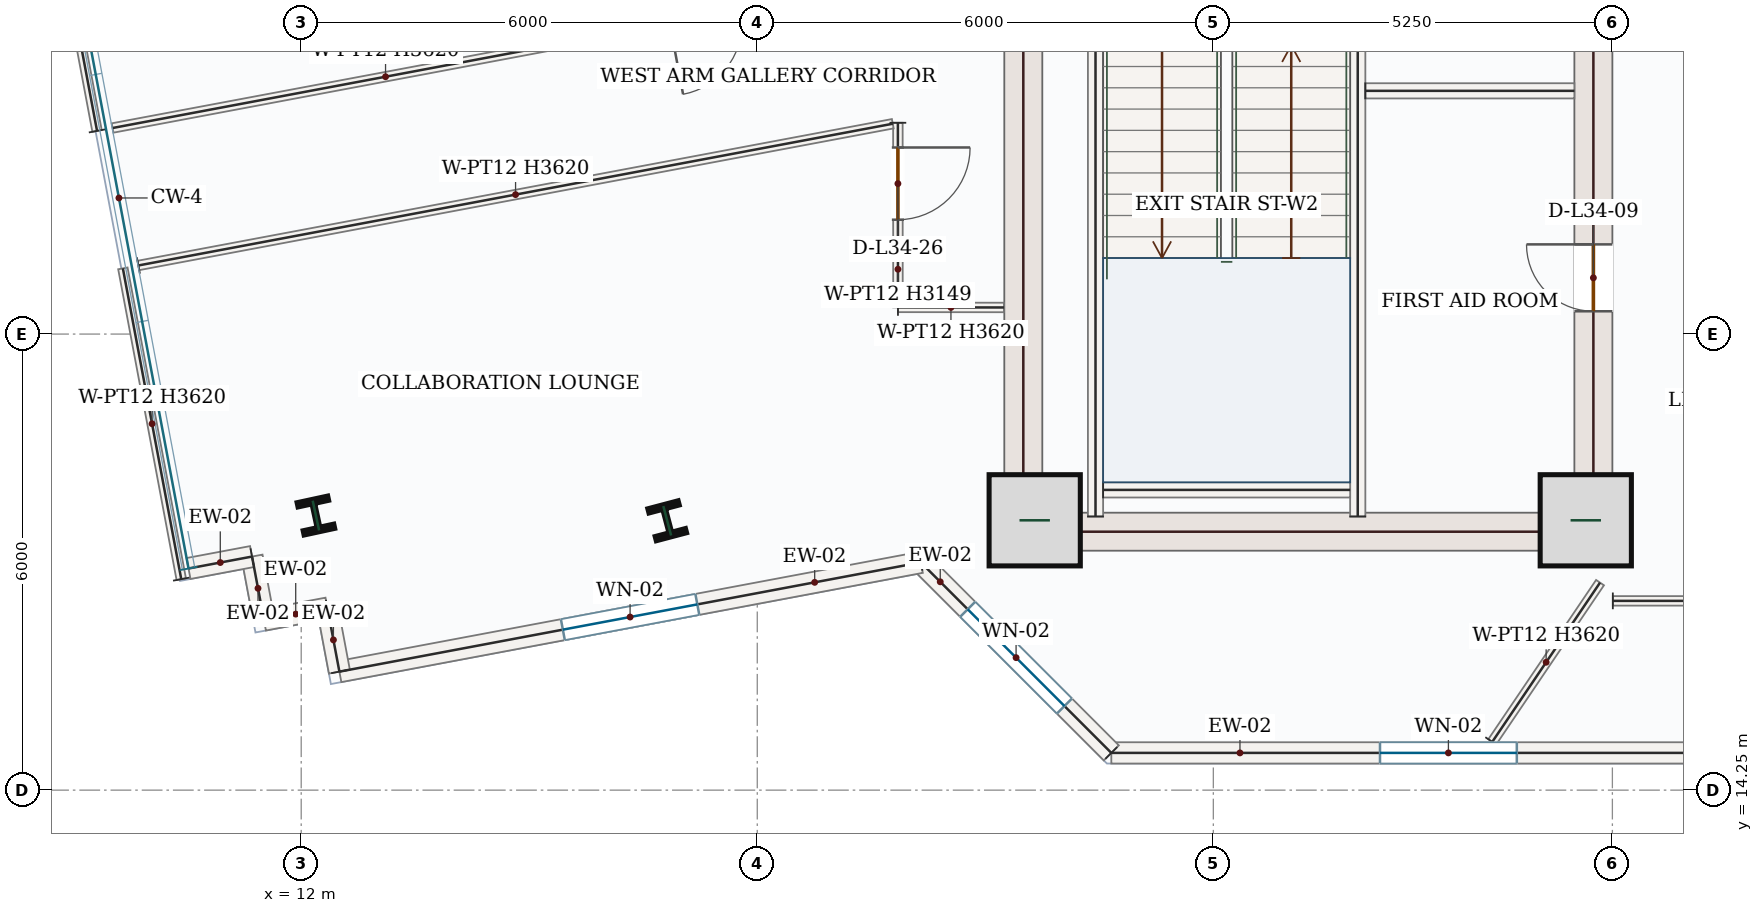
"""IFC4 building model, lengths in metres.
Left out: names, types, materials, properties, quantities, classifications, styles, units other than length and angle.
Written with IfcOpenShell. Run it as: python <this file> out.ifc"""

import sys

from ifc_helpers import new_model, si_unit, direction, frame, frame_2d, origin, origin_2d, place, context, subcontext, project, spatial, rectangle, i_section, extrude, source, transform, mapped, element, fill, save


model = new_model("IFC4")
c1 = context("Model", 3, precision=1e-05, world=origin(), true_north=direction((0.0, 1.0)))
c2 = subcontext(c1, "Body", "Model", "MODEL_VIEW")
j1 = project(units=[si_unit("LENGTHUNIT", "METRE"), si_unit("PLANEANGLEUNIT", "RADIAN")], contexts=[c1])
p1 = place(None, origin())
s1 = spatial("IfcSite", under=j1, at=p1, CompositionType="ELEMENT")
p2 = place(p1, origin())
s2 = spatial("IfcBuilding", under=s1, at=p2, CompositionType="ELEMENT")
p3 = place(p2, frame((0.0, 0.0, 151.2)))
s3 = spatial("IfcBuildingStorey", under=s2, at=p3, CompositionType="ELEMENT", Elevation=151.2)
m1 = source(origin(), c2, "Body", "SweptSolid", [
    extrude(rectangle(XDim=8.55, YDim=0.5, at=frame_2d((4.275, 0.0))), origin(), (0.0, 0.0, 1.0), 3.62),
])
p4 = place(p3, frame((21.5, 17.4, 0.0), z_axis=(0.0, 0.0, 1.0), x_axis=(0.0, 1.0, 0.0)))
e1 = element("IfcWall", 1, at=p4, inside=s3, PredefinedType="SHEAR", context=c2, shape_type="MappedRepresentation", body=[
    mapped(m1, transform((0.0, 0.0, 0.0), x_axis=(1.0, 0.0, 0.0), y_axis=(0.0, 1.0, 0.0), z_axis=(0.0, 0.0, 1.0), scale=1.0)),
])
p5 = place(p3, frame((29.0, 17.4, 0.0), z_axis=(0.0, 0.0, 1.0), x_axis=(0.0, 1.0, 0.0)))
e2 = element("IfcWall", 2, at=p5, inside=s3, PredefinedType="SHEAR", context=c2, shape_type="SweptSolid", body=[
    extrude(rectangle(XDim=8.55, YDim=0.5, at=frame_2d((4.275, 0.0))), origin(), (0.0, 0.0, 1.0), 3.62),
])
p6 = place(p5, frame((6.65, 0.0, 0.0)))
e3 = element("IfcOpeningElement", 3, at=p6, cuts=e2, PredefinedType="OPENING", context=c2, shape_type="SweptSolid", body=[
    extrude(rectangle(XDim=1.1, YDim=2.2, at=frame_2d((0.55, 1.1))), frame((0.0, 0.26, 0.0), z_axis=(0.0, -1.0, 0.0), x_axis=(1.0, 0.0, 0.0)), (0.0, 0.0, 1.0), 0.52),
])
p7 = place(p5, frame((3.15, 0.0, 0.0)))
e4 = element("IfcOpeningElement", 4, at=p7, cuts=e2, PredefinedType="OPENING", context=c2, shape_type="SweptSolid", body=[
    extrude(rectangle(XDim=0.88, YDim=2.1, at=frame_2d((0.44, 1.05))), frame((0.0, 0.26, 0.0), z_axis=(0.0, -1.0, 0.0), x_axis=(1.0, 0.0, 0.0)), (0.0, 0.0, 1.0), 0.52),
])
m2 = source(origin(), c2, "Body", "SweptSolid", [
    extrude(rectangle(XDim=7.0, YDim=0.5, at=frame_2d((3.5, 0.0))), origin(), (0.0, 0.0, 1.0), 3.62),
])
p8 = place(p3, frame((21.75, 17.65, 0.0), z_axis=(0.0, 0.0, 1.0), x_axis=(1.0, 0.0, 0.0)))
e5 = element("IfcWall", 5, at=p8, inside=s3, PredefinedType="SHEAR", context=c2, shape_type="MappedRepresentation", body=[
    mapped(m2, transform((0.0, 0.0, 0.0), x_axis=(1.0, 0.0, 0.0), y_axis=(0.0, 1.0, 0.0), z_axis=(0.0, 0.0, 1.0), scale=1.0)),
])
m3 = source(origin(), c2, "Body", "SweptSolid", [
    extrude(rectangle(XDim=1.2, YDim=1.2, at=origin_2d()), origin(), (0.0, 0.0, 1.0), 3.9),
])
for number, where, z_axis, x_axis in (
    (6, (21.65, 17.8, 0.0), (0.0, 0.0, 1.0), (1.0, 0.0, 0.0)),
    (7, (28.9, 17.8, 0.0), (0.0, 0.0, 1.0), (1.0, 0.0, 0.0)),
):
    element("IfcColumn", number, at=place(p3, frame(where, z_axis=z_axis, x_axis=x_axis)), inside=s3, PredefinedType="COLUMN", context=c2, shape_type="MappedRepresentation", body=[
        mapped(m3, transform((0.0, 0.0, 0.0), x_axis=(1.0, 0.0, 0.0), y_axis=(0.0, 1.0, 0.0), z_axis=(0.0, 0.0, 1.0), scale=1.0)),
    ])
m4 = source(origin(), c2, "Body", "SweptSolid", [
    extrude(i_section(OverallWidth=0.412, OverallDepth=0.435, WebThickness=0.036, FlangeThickness=0.057, FilletRadius=0.018, at=origin_2d()), origin(), (0.0, 0.0, 1.0), 3.9),
])
for number, where, z_axis, x_axis in (
    (8, (16.815, 17.794, 0.0), (0.0, 0.0, 1.0), (0.967, 0.255, 0.0)),
    (9, (12.193, 17.863, 0.0), (0.0, 0.0, 1.0), (0.977, 0.211, 0.0)),
):
    element("IfcColumn", number, at=place(p3, frame(where, z_axis=z_axis, x_axis=x_axis)), inside=s3, PredefinedType="COLUMN", context=c2, shape_type="MappedRepresentation", body=[
        mapped(m4, transform((0.0, 0.0, 0.0), x_axis=(1.0, 0.0, 0.0), y_axis=(0.0, 1.0, 0.0), z_axis=(0.0, 0.0, 1.0), scale=1.0)),
    ])
p9 = place(p3, frame((31.527, 14.74, 0.0), z_axis=(0.0, 0.0, 1.0), x_axis=(-1.0, 0.0, 0.0)))
e10 = element("IfcWall", 10, at=p9, inside=s3, PredefinedType="SOLIDWALL", context=c2, shape_type="SweptSolid", body=[
    extrude(rectangle(XDim=8.869, YDim=0.28, at=frame_2d((4.434, 0.0))), origin(), (0.0, 0.0, 1.0), 3.62),
])
p10 = place(p9, frame((3.534, 0.0, 0.85)))
e11 = element("IfcOpeningElement", 11, at=p10, cuts=e10, PredefinedType="OPENING", context=c2, shape_type="SweptSolid", body=[
    extrude(rectangle(XDim=1.8, YDim=1.75, at=frame_2d((0.9, 0.875))), frame((0.0, 0.15, 0.0), z_axis=(0.0, -1.0, 0.0), x_axis=(1.0, 0.0, 0.0)), (0.0, 0.0, 1.0), 0.3),
])
p11 = place(p3, frame((22.658, 14.74, 0.0), z_axis=(0.0, 0.0, 1.0), x_axis=(-0.707106781187, 0.707106781187, 0.0)))
e12 = element("IfcWall", 12, at=p11, inside=s3, PredefinedType="SOLIDWALL", context=c2, shape_type="SweptSolid", body=[
    extrude(rectangle(XDim=3.544, YDim=0.28, at=frame_2d((1.772, 0.0))), origin(), (0.0, 0.0, 1.0), 3.62),
])
p12 = place(p11, frame((0.872, 0.0, 0.85)))
e13 = element("IfcOpeningElement", 13, at=p12, cuts=e12, PredefinedType="OPENING", context=c2, shape_type="SweptSolid", body=[
    extrude(rectangle(XDim=1.8, YDim=1.75, at=frame_2d((0.9, 0.875))), frame((0.0, 0.15, 0.0), z_axis=(0.0, -1.0, 0.0), x_axis=(1.0, 0.0, 0.0)), (0.0, 0.0, 1.0), 0.3),
])
p13 = place(p3, frame((20.152, 17.246, 0.0), z_axis=(0.0, 0.0, 1.0), x_axis=(-0.982809278234, -0.18462373254, 0.0)))
e14 = element("IfcWall", 14, at=p13, inside=s3, PredefinedType="SOLIDWALL", context=c2, shape_type="SweptSolid", body=[
    extrude(rectangle(XDim=7.783, YDim=0.28, at=frame_2d((3.892, 0.0))), origin(), (0.0, 0.0, 1.0), 3.62),
])
p14 = place(p13, frame((2.992, 0.0, 0.85)))
e15 = element("IfcOpeningElement", 15, at=p14, cuts=e14, PredefinedType="OPENING", context=c2, shape_type="SweptSolid", body=[
    extrude(rectangle(XDim=1.8, YDim=1.75, at=frame_2d((0.9, 0.875))), frame((0.0, 0.15, 0.0), z_axis=(0.0, -1.0, 0.0), x_axis=(1.0, 0.0, 0.0)), (0.0, 0.0, 1.0), 0.3),
])
m5 = source(origin(), c2, "Body", "SweptSolid", [
    extrude(rectangle(XDim=0.85, YDim=0.28, at=frame_2d((0.425, 0.0))), origin(), (0.0, 0.0, 1.0), 3.62),
])
p15 = place(p3, frame((12.502, 15.809, 0.0), z_axis=(0.0, 0.0, 1.0), x_axis=(-0.184670010318, 0.982800583684, 0.0)))
e16 = element("IfcWall", 16, at=p15, inside=s3, PredefinedType="SOLIDWALL", context=c2, shape_type="MappedRepresentation", body=[
    mapped(m5, transform((0.0, 0.0, 0.0), x_axis=(1.0, 0.0, 0.0), y_axis=(0.0, 1.0, 0.0), z_axis=(0.0, 0.0, 1.0), scale=1.0)),
])
m6 = source(origin(), c2, "Body", "SweptSolid", [
    extrude(rectangle(XDim=0.85, YDim=0.28, at=frame_2d((0.425, 0.0))), origin(), (0.0, 0.0, 1.0), 3.62),
])
for number, where, z_axis, x_axis in (
    (17, (12.345, 16.645, 0.0), (0.0, 0.0, 1.0), (-0.983, -0.185, 0.0)),
    (18, (11.51, 16.488, 0.0), (0.0, 0.0, 1.0), (-0.185, 0.983, 0.0)),
):
    element("IfcWall", number, at=place(p3, frame(where, z_axis=z_axis, x_axis=x_axis)), inside=s3, PredefinedType="SOLIDWALL", context=c2, shape_type="MappedRepresentation", body=[
        mapped(m6, transform((0.0, 0.0, 0.0), x_axis=(1.0, 0.0, 0.0), y_axis=(0.0, 1.0, 0.0), z_axis=(0.0, 0.0, 1.0), scale=1.0)),
    ])
p16 = place(p3, frame((11.353, 17.323, 0.0), z_axis=(0.0, 0.0, 1.0), x_axis=(-0.982852672425, -0.184392582027, 0.0)))
e19 = element("IfcWall", 19, at=p16, inside=s3, PredefinedType="SOLIDWALL", context=c2, shape_type="MappedRepresentation", body=[
    mapped(m5, transform((0.0, 0.0, 0.0), x_axis=(1.0, 0.0, 0.0), y_axis=(0.0, 1.0, 0.0), z_axis=(0.0, 0.0, 1.0), scale=1.0)),
])
m7 = source(origin(), c2, "Body", "SweptSolid", [
    extrude(rectangle(XDim=7.87, YDim=0.2, at=frame_2d((3.935, 0.0))), origin(), (0.0, 0.0, 1.0), 3.62),
])
p17 = place(p3, frame((22.45, 17.85, 0.0), z_axis=(0.0, 0.0, 1.0), x_axis=(0.0, 1.0, 0.0)))
e20 = element("IfcWall", 20, at=p17, inside=s3, PredefinedType="SOLIDWALL", context=c2, shape_type="MappedRepresentation", body=[
    mapped(m7, transform((0.0, 0.0, 0.0), x_axis=(1.0, 0.0, 0.0), y_axis=(0.0, 1.0, 0.0), z_axis=(0.0, 0.0, 1.0), scale=1.0)),
])
p18 = place(p3, frame((25.9, 17.85, 0.0), z_axis=(0.0, 0.0, 1.0), x_axis=(0.0, 1.0, 0.0)))
e21 = element("IfcWall", 21, at=p18, inside=s3, PredefinedType="SOLIDWALL", context=c2, shape_type="SweptSolid", body=[
    extrude(rectangle(XDim=8.0, YDim=0.2, at=frame_2d((4.0, 0.0))), origin(), (0.0, 0.0, 1.0), 3.62),
])
p19 = place(p18, frame((6.3, 0.0, 0.0)))
e22 = element("IfcOpeningElement", 22, at=p19, cuts=e21, PredefinedType="OPENING", context=c2, shape_type="SweptSolid", body=[
    extrude(rectangle(XDim=1.05, YDim=2.15, at=frame_2d((0.525, 1.075))), frame((0.0, 0.11, 0.0), z_axis=(0.0, -1.0, 0.0), x_axis=(1.0, 0.0, 0.0)), (0.0, 0.0, 1.0), 0.22),
])
m8 = source(origin(), c2, "Body", "SweptSolid", [
    extrude(rectangle(XDim=3.25, YDim=0.2, at=frame_2d((1.625, 0.0))), origin(), (0.0, 0.0, 1.0), 3.62),
])
p20 = place(p3, frame((22.55, 18.2, 0.0), z_axis=(0.0, 0.0, 1.0), x_axis=(1.0, 0.0, 0.0)))
e23 = element("IfcWall", 23, at=p20, inside=s3, PredefinedType="SOLIDWALL", context=c2, shape_type="MappedRepresentation", body=[
    mapped(m8, transform((0.0, 0.0, 0.0), x_axis=(1.0, 0.0, 0.0), y_axis=(0.0, 1.0, 0.0), z_axis=(0.0, 0.0, 1.0), scale=1.0)),
])
m9 = source(origin(), c2, "Body", "SweptSolid", [
    extrude(rectangle(XDim=2.75, YDim=0.2, at=frame_2d((1.375, 0.0))), origin(), (0.0, 0.0, 1.0), 3.62),
])
p21 = place(p3, frame((26.0, 23.45, 0.0), z_axis=(0.0, 0.0, 1.0), x_axis=(1.0, 0.0, 0.0)))
e24 = element("IfcWall", 24, at=p21, inside=s3, PredefinedType="SOLIDWALL", context=c2, shape_type="MappedRepresentation", body=[
    mapped(m9, transform((0.0, 0.0, 0.0), x_axis=(1.0, 0.0, 0.0), y_axis=(0.0, 1.0, 0.0), z_axis=(0.0, 0.0, 1.0), scale=1.0)),
])
p22 = place(p3, frame((29.256, 16.74, 0.0), z_axis=(0.0, 0.0, 1.0), x_axis=(1.0, 0.0, 0.0)))
e25 = element("IfcWall", 25, at=p22, inside=s3, PredefinedType="PARTITIONING", context=c2, shape_type="SweptSolid", body=[
    extrude(rectangle(XDim=7.736, YDim=0.125, at=frame_2d((3.868, 0.0))), origin(), (0.0, 0.0, 1.0), 3.62),
])
p23 = place(p22, frame((5.293, 0.0, 0.0)))
e26 = element("IfcOpeningElement", 26, at=p23, cuts=e25, PredefinedType="OPENING", context=c2, shape_type="SweptSolid", body=[
    extrude(rectangle(XDim=0.95, YDim=2.15, at=frame_2d((0.475, 1.075))), frame((0.0, 0.073, 0.0), z_axis=(0.0, -1.0, 0.0), x_axis=(1.0, 0.0, 0.0)), (0.0, 0.0, 1.0), 0.145),
])
m10 = source(origin(), c2, "Body", "SweptSolid", [
    extrude(rectangle(XDim=2.53, YDim=0.125, at=frame_2d((1.265, 0.0))), origin(), (0.0, 0.0, 1.0), 3.62),
])
p24 = place(p3, frame((27.67, 14.885, 0.0), z_axis=(0.0, 0.0, 1.0), x_axis=(0.560455418396, 0.82818459536, 0.0)))
e27 = element("IfcWall", 27, at=p24, inside=s3, PredefinedType="PARTITIONING", context=c2, shape_type="MappedRepresentation", body=[
    mapped(m10, transform((0.0, 0.0, 0.0), x_axis=(1.0, 0.0, 0.0), y_axis=(0.0, 1.0, 0.0), z_axis=(0.0, 0.0, 1.0), scale=1.0)),
])
m11 = source(origin(), c2, "Body", "SweptSolid", [
    extrude(rectangle(XDim=4.16, YDim=0.125, at=frame_2d((2.08, 0.0))), origin(), (0.0, 0.0, 1.0), 3.62),
])
p25 = place(p3, frame((9.314, 22.923, 0.0), z_axis=(0.0, 0.0, 1.0), x_axis=(-0.184635785614, 0.982807013951, 0.0)))
e28 = element("IfcWall", 28, at=p25, inside=s3, PredefinedType="PARTITIONING", context=c2, shape_type="MappedRepresentation", body=[
    mapped(m11, transform((0.0, 0.0, 0.0), x_axis=(1.0, 0.0, 0.0), y_axis=(0.0, 1.0, 0.0), z_axis=(0.0, 0.0, 1.0), scale=1.0)),
])
p26 = place(p3, frame((19.85, 24.902, 0.0), z_axis=(0.0, 0.0, 1.0), x_axis=(-0.982804817995, -0.184647474194, 0.0)))
e29 = element("IfcWall", 29, at=p26, inside=s3, PredefinedType="PARTITIONING", context=c2, shape_type="SweptSolid", body=[
    extrude(rectangle(XDim=10.513, YDim=0.125, at=frame_2d((5.256, 0.0))), origin(), (0.0, 0.0, 1.0), 3.62),
])
p27 = place(p26, frame((2.104, 0.0, 0.0)))
e30 = element("IfcOpeningElement", 30, at=p27, cuts=e29, PredefinedType="OPENING", context=c2, shape_type="SweptSolid", body=[
    extrude(rectangle(XDim=0.95, YDim=2.15, at=frame_2d((0.475, 1.075))), frame((0.0, 0.073, 0.0), z_axis=(0.0, -1.0, 0.0), x_axis=(1.0, 0.0, 0.0)), (0.0, 0.0, 1.0), 0.145),
])
p28 = place(p3, frame((19.85, 23.03, 0.0), z_axis=(0.0, 0.0, 1.0), x_axis=(0.00040209084, -0.999999919161, 0.0)))
e31 = element("IfcWall", 31, at=p28, inside=s3, PredefinedType="PARTITIONING", context=c2, shape_type="SweptSolid", body=[
    extrude(rectangle(XDim=2.429, YDim=0.125, at=frame_2d((1.214, 0.0))), origin(), (0.0, 0.0, 1.0), 3.149),
])
p29 = place(p28, frame((0.325, 0.0, 0.0)))
e32 = element("IfcOpeningElement", 32, at=p29, cuts=e31, PredefinedType="OPENING", context=c2, shape_type="SweptSolid", body=[
    extrude(rectangle(XDim=0.95, YDim=2.15, at=frame_2d((0.475, 1.075))), frame((0.0, 0.073, 0.0), z_axis=(0.0, -1.0, 0.0), x_axis=(1.0, 0.0, 0.0)), (0.0, 0.0, 1.0), 0.145),
])
m12 = source(origin(), c2, "Body", "SweptSolid", [
    extrude(rectangle(XDim=1.394, YDim=0.125, at=frame_2d((0.697, 0.0))), origin(), (0.0, 0.0, 1.0), 3.62),
])
p30 = place(p3, frame((19.851, 20.601, 0.0), z_axis=(0.0, 0.0, 1.0), x_axis=(0.999999754632, -0.000700525222, 0.0)))
e33 = element("IfcWall", 33, at=p30, inside=s3, PredefinedType="PARTITIONING", context=c2, shape_type="MappedRepresentation", body=[
    mapped(m12, transform((0.0, 0.0, 0.0), x_axis=(1.0, 0.0, 0.0), y_axis=(0.0, 1.0, 0.0), z_axis=(0.0, 0.0, 1.0), scale=1.0)),
])
p31 = place(p3, frame((10.422, 17.026, 0.0), z_axis=(0.0, 0.0, 1.0), x_axis=(-0.184635785614, 0.982807013951, 0.0)))
e34 = element("IfcWall", 34, at=p31, inside=s3, PredefinedType="PARTITIONING", context=c2, shape_type="MappedRepresentation", body=[
    mapped(m11, transform((0.0, 0.0, 0.0), x_axis=(1.0, 0.0, 0.0), y_axis=(0.0, 1.0, 0.0), z_axis=(0.0, 0.0, 1.0), scale=1.0)),
])
m13 = source(origin(), c2, "Body", "SweptSolid", [
    extrude(rectangle(XDim=10.098, YDim=0.125, at=frame_2d((5.049, 0.0))), origin(), (0.0, 0.0, 1.0), 3.62),
])
p32 = place(p3, frame((9.858, 21.153, 0.0), z_axis=(0.0, 0.0, 1.0), x_axis=(0.982807535277, 0.1846330106, 0.0)))
e35 = element("IfcWall", 35, at=p32, inside=s3, PredefinedType="PARTITIONING", context=c2, shape_type="MappedRepresentation", body=[
    mapped(m13, transform((0.0, 0.0, 0.0), x_axis=(1.0, 0.0, 0.0), y_axis=(0.0, 1.0, 0.0), z_axis=(0.0, 0.0, 1.0), scale=1.0)),
])
m14 = source(origin(), c2, "Body", "SweptSolid", [
    extrude(rectangle(XDim=1.8, YDim=1.75, at=frame_2d((0.9, 0.875))), frame((0.0, 0.03, 0.0), z_axis=(0.0, -1.0, 0.0), x_axis=(1.0, 0.0, 0.0)), (0.0, 0.0, 1.0), 0.06),
])
p33 = place(p10, origin())
e36 = element("IfcWindow", 36, at=p33, inside=s3, PartitioningType="DOUBLE_PANEL_VERTICAL", PredefinedType="WINDOW", context=c2, shape_type="MappedRepresentation", body=[
    mapped(m14, transform((0.0, 0.0, 0.0), x_axis=(1.0, 0.0, 0.0), y_axis=(0.0, 1.0, 0.0), z_axis=(0.0, 0.0, 1.0), scale=1.0)),
])
fill(e11, e36)
p34 = place(p12, origin())
e37 = element("IfcWindow", 37, at=p34, inside=s3, PartitioningType="DOUBLE_PANEL_VERTICAL", PredefinedType="WINDOW", context=c2, shape_type="MappedRepresentation", body=[
    mapped(m14, transform((0.0, 0.0, 0.0), x_axis=(1.0, 0.0, 0.0), y_axis=(0.0, 1.0, 0.0), z_axis=(0.0, 0.0, 1.0), scale=1.0)),
])
fill(e13, e37)
p35 = place(p14, origin())
e38 = element("IfcWindow", 38, at=p35, inside=s3, PartitioningType="DOUBLE_PANEL_VERTICAL", PredefinedType="WINDOW", context=c2, shape_type="MappedRepresentation", body=[
    mapped(m14, transform((0.0, 0.0, 0.0), x_axis=(1.0, 0.0, 0.0), y_axis=(0.0, 1.0, 0.0), z_axis=(0.0, 0.0, 1.0), scale=1.0)),
])
fill(e15, e38)
m15 = source(origin(), c2, "Body", "SweptSolid", [
    extrude(rectangle(XDim=0.88, YDim=2.1, at=frame_2d((0.44, 1.05))), frame((0.0, 0.025, 0.0), z_axis=(0.0, -1.0, 0.0), x_axis=(1.0, 0.0, 0.0)), (0.0, 0.0, 1.0), 0.05),
])
p36 = place(p7, origin())
e39 = element("IfcDoor", 39, at=p36, inside=s3, OperationType="SINGLE_SWING_RIGHT", PredefinedType="DOOR", context=c2, shape_type="MappedRepresentation", body=[
    mapped(m15, transform((0.0, 0.0, 0.0), x_axis=(1.0, 0.0, 0.0), y_axis=(0.0, 1.0, 0.0), z_axis=(0.0, 0.0, 1.0), scale=1.0)),
])
fill(e4, e39)
m16 = source(origin(), c2, "Body", "SweptSolid", [
    extrude(rectangle(XDim=0.95, YDim=2.15, at=frame_2d((0.475, 1.075))), frame((0.0, 0.025, 0.0), z_axis=(0.0, -1.0, 0.0), x_axis=(1.0, 0.0, 0.0)), (0.0, 0.0, 1.0), 0.05),
])
p37 = place(p29, origin())
e40 = element("IfcDoor", 40, at=p37, inside=s3, OperationType="SINGLE_SWING_LEFT", PredefinedType="DOOR", context=c2, shape_type="MappedRepresentation", body=[
    mapped(m16, transform((0.0, 0.0, 0.0), x_axis=(1.0, 0.0, 0.0), y_axis=(0.0, 1.0, 0.0), z_axis=(0.0, 0.0, 1.0), scale=1.0)),
])
fill(e32, e40)
save(model, sys.argv[1])
